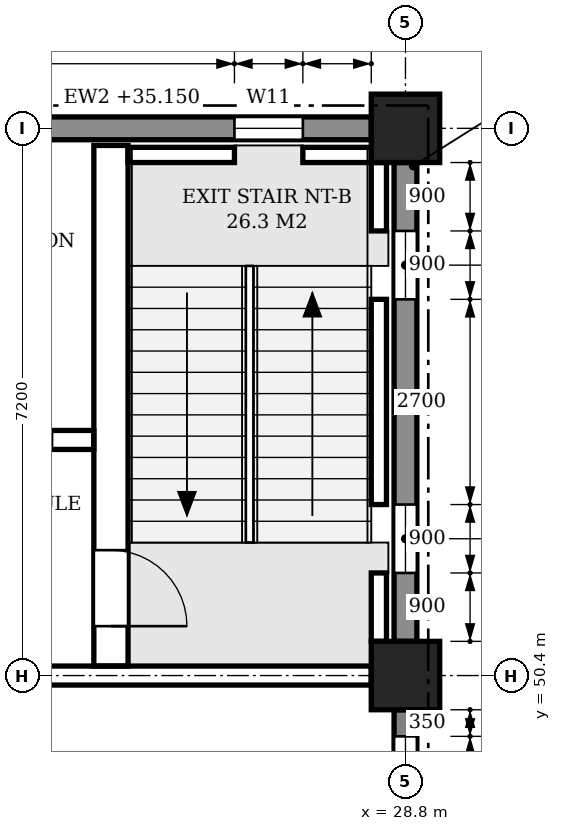
"""IFC4 building model, lengths in metres.
Left out: names, types, materials, properties, quantities, classifications, styles, units other than length and angle.
Written with IfcOpenShell. Run it as: python <this file> out.ifc"""

import sys

from ifc_helpers import new_model, si_unit, direction, frame, frame_2d, origin, origin_2d, place, context, subcontext, project, spatial, polyline, rectangle, outline, extrude, element, fill, save


model = new_model("IFC4")
c1 = context("Model", 3, precision=1e-05, world=origin(), true_north=direction((0.0, 1.0)))
c2 = subcontext(c1, "Body", "Model", "MODEL_VIEW")
j1 = project(units=[si_unit("LENGTHUNIT", "METRE"), si_unit("PLANEANGLEUNIT", "RADIAN")], contexts=[c1])
p1 = place(None, origin())
s1 = spatial("IfcSite", under=j1, at=p1, CompositionType="ELEMENT")
p2 = place(p1, origin())
s2 = spatial("IfcBuilding", under=s1, at=p2, CompositionType="ELEMENT")
p3 = place(p2, frame((0.0, 0.0, 31.2)))
s3 = spatial("IfcBuildingStorey", under=s2, at=p3, CompositionType="ELEMENT", Elevation=31.2)
for number, where, z_axis, x_axis in (
    (1, (28.8, 50.4, 0.0), (0.0, 0.0, 1.0), (1.0, 0.0, 0.0)),
    (2, (28.8, 57.6, 0.0), (0.0, 0.0, 1.0), (1.0, 0.0, 0.0)),
):
    element("IfcColumn", number, at=place(p3, frame(where, z_axis=z_axis, x_axis=x_axis)), inside=s3, PredefinedType="COLUMN", context=c2, shape_type="SweptSolid", body=[
        extrude(rectangle(XDim=0.9, YDim=0.9, at=origin_2d()), origin(), (0.0, 0.0, 1.0), 4.8),
    ])
p4 = place(p3, frame((28.35, 57.6, 0.0), z_axis=(0.0, 0.0, 1.0), x_axis=(-1.0, 0.0, 0.0)))
e3 = element("IfcWall", 3, at=p4, inside=s3, PredefinedType="STANDARD", context=c2, shape_type="SweptSolid", body=[
    extrude(rectangle(XDim=6.3, YDim=0.3, at=frame_2d((3.15, 0.0))), origin(), (0.0, 0.0, 1.0), 3.95),
])
p5 = place(p4, frame((0.9, 0.0, 0.9)))
e4 = element("IfcOpeningElement", 4, at=p5, cuts=e3, PredefinedType="OPENING", context=c2, shape_type="SweptSolid", body=[
    extrude(outline(polyline([(0.0, 0.0), (0.9, 0.0), (0.9, 2.05), (0.45, 2.5), (0.0, 2.05), (0.0, 0.0)])), frame((0.0, 0.16, 0.0), z_axis=(0.0, -1.0, 0.0), x_axis=(1.0, 0.0, 0.0)), (0.0, 0.0, 1.0), 0.32),
])
p6 = place(p3, frame((28.8, 43.65, 0.0), z_axis=(0.0, 0.0, 1.0), x_axis=(0.0, 1.0, 0.0)))
e5 = element("IfcWall", 5, at=p6, inside=s3, PredefinedType="STANDARD", context=c2, shape_type="SweptSolid", body=[
    extrude(rectangle(XDim=6.3, YDim=0.3, at=frame_2d((3.15, 0.0))), origin(), (0.0, 0.0, 1.0), 3.95),
])
p7 = place(p6, frame((3.95, 0.0, 0.9)))
e6 = element("IfcOpeningElement", 6, at=p7, cuts=e5, PredefinedType="OPENING", context=c2, shape_type="SweptSolid", body=[
    extrude(outline(polyline([(0.0, 0.0), (0.85, 0.0), (0.85, 2.05), (0.425, 2.5), (0.0, 2.05), (0.0, 0.0)])), frame((0.0, 0.16, 0.0), z_axis=(0.0, -1.0, 0.0), x_axis=(1.0, 0.0, 0.0)), (0.0, 0.0, 1.0), 0.32),
])
p8 = place(p6, frame((5.1, 0.0, 0.9)))
e7 = element("IfcOpeningElement", 7, at=p8, cuts=e5, PredefinedType="OPENING", context=c2, shape_type="SweptSolid", body=[
    extrude(outline(polyline([(0.0, 0.0), (0.85, 0.0), (0.85, 2.05), (0.425, 2.5), (0.0, 2.05), (0.0, 0.0)])), frame((0.0, 0.16, 0.0), z_axis=(0.0, -1.0, 0.0), x_axis=(1.0, 0.0, 0.0)), (0.0, 0.0, 1.0), 0.32),
])
p9 = place(p3, frame((28.8, 50.85, 0.0), z_axis=(0.0, 0.0, 1.0), x_axis=(0.0, 1.0, 0.0)))
e8 = element("IfcWall", 8, at=p9, inside=s3, PredefinedType="STANDARD", context=c2, shape_type="SweptSolid", body=[
    extrude(rectangle(XDim=6.3, YDim=0.3, at=frame_2d((3.15, 0.0))), origin(), (0.0, 0.0, 1.0), 3.95),
])
p10 = place(p9, frame((0.9, 0.0, 0.9)))
e9 = element("IfcOpeningElement", 9, at=p10, cuts=e8, PredefinedType="OPENING", context=c2, shape_type="SweptSolid", body=[
    extrude(outline(polyline([(0.0, 0.0), (0.9, 0.0), (0.9, 2.05), (0.45, 2.5), (0.0, 2.05), (0.0, 0.0)])), frame((0.0, 0.16, 0.0), z_axis=(0.0, -1.0, 0.0), x_axis=(1.0, 0.0, 0.0)), (0.0, 0.0, 1.0), 0.32),
])
p11 = place(p9, frame((4.5, 0.0, 0.9)))
e10 = element("IfcOpeningElement", 10, at=p11, cuts=e8, PredefinedType="OPENING", context=c2, shape_type="SweptSolid", body=[
    extrude(outline(polyline([(0.0, 0.0), (0.9, 0.0), (0.9, 2.05), (0.45, 2.5), (0.0, 2.05), (0.0, 0.0)])), frame((0.0, 0.16, 0.0), z_axis=(0.0, -1.0, 0.0), x_axis=(1.0, 0.0, 0.0)), (0.0, 0.0, 1.0), 0.32),
])
p12 = place(p3, frame((22.05, 50.4, 0.0), z_axis=(0.0, 0.0, 1.0), x_axis=(1.0, 0.0, 0.0)))
e11 = element("IfcWall", 11, at=p12, inside=s3, PredefinedType="SHEAR", context=c2, shape_type="SweptSolid", body=[
    extrude(rectangle(XDim=6.3, YDim=0.25, at=frame_2d((3.15, 0.0))), origin(), (0.0, 0.0, 1.0), 3.8),
])
p13 = place(p12, frame((0.4, 0.0, 0.0)))
e12 = element("IfcOpeningElement", 12, at=p13, cuts=e11, PredefinedType="OPENING", context=c2, shape_type="SweptSolid", body=[
    extrude(rectangle(XDim=1.1, YDim=2.1, at=frame_2d((0.55, 1.05))), frame((0.0, 0.135, 0.0), z_axis=(0.0, -1.0, 0.0), x_axis=(1.0, 0.0, 0.0)), (0.0, 0.0, 1.0), 0.27),
])
p14 = place(p3, frame((28.45, 50.85, -0.25), z_axis=(0.0, 0.0, 1.0), x_axis=(0.0, 1.0, 0.0)))
e13 = element("IfcWall", 13, at=p14, inside=s3, PredefinedType="SHEAR", context=c2, shape_type="SweptSolid", body=[
    extrude(rectangle(XDim=0.9, YDim=0.2, at=frame_2d((0.45, 0.0))), origin(), (0.0, 0.0, 1.0), 4.8),
])
p15 = place(p3, frame((28.45, 52.65, -0.25), z_axis=(0.0, 0.0, 1.0), x_axis=(0.0, 1.0, 0.0)))
e14 = element("IfcWall", 14, at=p15, inside=s3, PredefinedType="SHEAR", context=c2, shape_type="SweptSolid", body=[
    extrude(rectangle(XDim=2.7, YDim=0.2, at=frame_2d((1.35, 0.0))), origin(), (0.0, 0.0, 1.0), 4.8),
])
p16 = place(p3, frame((28.45, 56.25, -0.25), z_axis=(0.0, 0.0, 1.0), x_axis=(0.0, 1.0, 0.0)))
e15 = element("IfcWall", 15, at=p16, inside=s3, PredefinedType="SHEAR", context=c2, shape_type="SweptSolid", body=[
    extrude(rectangle(XDim=0.9, YDim=0.2, at=frame_2d((0.45, 0.0))), origin(), (0.0, 0.0, 1.0), 4.8),
])
p17 = place(p3, frame((25.15, 57.25, -0.25), z_axis=(0.0, 0.0, 1.0), x_axis=(1.0, 0.0, 0.0)))
e16 = element("IfcWall", 16, at=p17, inside=s3, PredefinedType="SHEAR", context=c2, shape_type="SweptSolid", body=[
    extrude(rectangle(XDim=1.4, YDim=0.2, at=frame_2d((0.7, 0.0))), origin(), (0.0, 0.0, 1.0), 4.8),
])
p18 = place(p3, frame((27.45, 57.25, -0.25), z_axis=(0.0, 0.0, 1.0), x_axis=(1.0, 0.0, 0.0)))
e17 = element("IfcWall", 17, at=p18, inside=s3, PredefinedType="SHEAR", context=c2, shape_type="SweptSolid", body=[
    extrude(rectangle(XDim=0.9, YDim=0.2, at=frame_2d((0.45, 0.0))), origin(), (0.0, 0.0, 1.0), 4.8),
])
p19 = place(p3, frame((24.925, 50.525, 0.0), z_axis=(0.0, 0.0, 1.0), x_axis=(0.0, 1.0, 0.0)))
e18 = element("IfcWall", 18, at=p19, inside=s3, PredefinedType="SHEAR", context=c2, shape_type="SweptSolid", body=[
    extrude(rectangle(XDim=6.85, YDim=0.45, at=frame_2d((3.425, 0.0))), origin(), (0.0, 0.0, 1.0), 4.55),
])
p20 = place(p19, frame((0.525, 0.0, 0.0)))
e19 = element("IfcOpeningElement", 19, at=p20, cuts=e18, PredefinedType="OPENING", context=c2, shape_type="SweptSolid", body=[
    extrude(rectangle(XDim=1.0, YDim=2.1, at=frame_2d((0.5, 1.05))), frame((0.0, 0.235, 0.0), z_axis=(0.0, -1.0, 0.0), x_axis=(1.0, 0.0, 0.0)), (0.0, 0.0, 1.0), 0.47),
])
p21 = place(p3, frame((21.725, 53.5, 0.0), z_axis=(0.0, 0.0, 1.0), x_axis=(1.0, 0.0, 0.0)))
e20 = element("IfcWall", 20, at=p21, inside=s3, PredefinedType="SHEAR", context=c2, shape_type="SweptSolid", body=[
    extrude(rectangle(XDim=2.975, YDim=0.25, at=frame_2d((1.487, 0.0))), origin(), (0.0, 0.0, 1.0), 4.55),
])
p22 = place(p21, frame((1.525, 0.0, 0.0)))
e21 = element("IfcOpeningElement", 21, at=p22, cuts=e20, PredefinedType="OPENING", context=c2, shape_type="SweptSolid", body=[
    extrude(rectangle(XDim=0.9, YDim=2.1, at=frame_2d((0.45, 1.05))), frame((0.0, 0.135, 0.0), z_axis=(0.0, -1.0, 0.0), x_axis=(1.0, 0.0, 0.0)), (0.0, 0.0, 1.0), 0.27),
])
p23 = place(p8, origin())
e22 = element("IfcWindow", 22, at=p23, inside=s3, PartitioningType="SINGLE_PANEL", PredefinedType="WINDOW", context=c2, shape_type="SweptSolid", body=[
    extrude(outline(polyline([(0.0, 0.0), (0.85, 0.0), (0.85, 2.05), (0.425, 2.5), (0.0, 2.05), (0.0, 0.0)])), frame((0.0, 0.03, 0.0), z_axis=(0.0, -1.0, 0.0), x_axis=(1.0, 0.0, 0.0)), (0.0, 0.0, 1.0), 0.06),
])
fill(e7, e22)
p24 = place(p10, origin())
e23 = element("IfcWindow", 23, at=p24, inside=s3, PartitioningType="SINGLE_PANEL", PredefinedType="WINDOW", context=c2, shape_type="SweptSolid", body=[
    extrude(outline(polyline([(0.0, 0.0), (0.9, 0.0), (0.9, 2.05), (0.45, 2.5), (0.0, 2.05), (0.0, 0.0)])), frame((0.0, 0.03, 0.0), z_axis=(0.0, -1.0, 0.0), x_axis=(1.0, 0.0, 0.0)), (0.0, 0.0, 1.0), 0.06),
])
fill(e9, e23)
p25 = place(p11, origin())
e24 = element("IfcWindow", 24, at=p25, inside=s3, PartitioningType="SINGLE_PANEL", PredefinedType="WINDOW", context=c2, shape_type="SweptSolid", body=[
    extrude(outline(polyline([(0.0, 0.0), (0.9, 0.0), (0.9, 2.05), (0.45, 2.5), (0.0, 2.05), (0.0, 0.0)])), frame((0.0, 0.03, 0.0), z_axis=(0.0, -1.0, 0.0), x_axis=(1.0, 0.0, 0.0)), (0.0, 0.0, 1.0), 0.06),
])
fill(e10, e24)
p26 = place(p5, origin())
e25 = element("IfcWindow", 25, at=p26, inside=s3, PartitioningType="SINGLE_PANEL", PredefinedType="WINDOW", context=c2, shape_type="SweptSolid", body=[
    extrude(outline(polyline([(0.0, 0.0), (0.9, 0.0), (0.9, 2.05), (0.45, 2.5), (0.0, 2.05), (0.0, 0.0)])), frame((0.0, 0.03, 0.0), z_axis=(0.0, -1.0, 0.0), x_axis=(1.0, 0.0, 0.0)), (0.0, 0.0, 1.0), 0.06),
])
fill(e4, e25)
p27 = place(p20, frame((1.0, 0.0, 0.0), z_axis=(0.0, 0.0, 1.0), x_axis=(-1.0, 0.0, 0.0)))
e26 = element("IfcDoor", 26, at=p27, inside=s3, OperationType="SINGLE_SWING_RIGHT", PredefinedType="DOOR", context=c2, shape_type="SweptSolid", body=[
    extrude(rectangle(XDim=1.0, YDim=2.1, at=frame_2d((0.5, 1.05))), frame((0.0, 0.025, 0.0), z_axis=(0.0, -1.0, 0.0), x_axis=(1.0, 0.0, 0.0)), (0.0, 0.0, 1.0), 0.05),
])
fill(e19, e26)
save(model, sys.argv[1])
